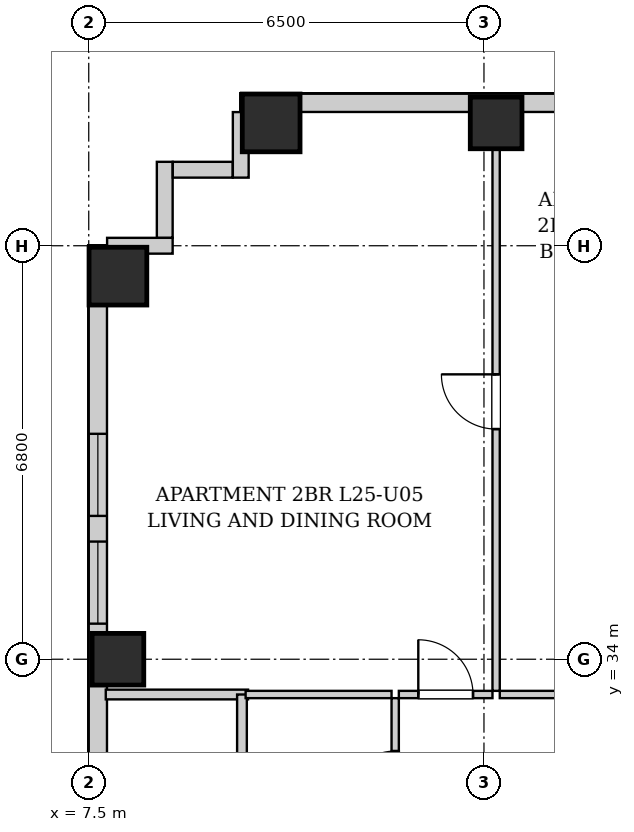
"""IFC4 building model, lengths in metres.
Left out: names, types, materials, properties, quantities, classifications, styles, units other than length and angle.
Written with IfcOpenShell. Run it as: python <this file> out.ifc"""

import sys

from ifc_helpers import new_model, si_unit, direction, frame, frame_2d, origin, origin_2d, place, context, subcontext, project, spatial, rectangle, extrude, element, fill, save


model = new_model("IFC4")
c1 = context("Model", 3, precision=1e-05, world=origin(), true_north=direction((0.0, 1.0)))
c2 = subcontext(c1, "Body", "Model", "MODEL_VIEW")
j1 = project(units=[si_unit("LENGTHUNIT", "METRE"), si_unit("PLANEANGLEUNIT", "RADIAN")], contexts=[c1])
p1 = place(None, origin())
s1 = spatial("IfcSite", under=j1, at=p1, CompositionType="ELEMENT")
p2 = place(p1, origin())
s2 = spatial("IfcBuilding", under=s1, at=p2, CompositionType="ELEMENT")
p3 = place(p2, frame((0.0, 0.0, 91.1)))
s3 = spatial("IfcBuildingStorey", under=s2, at=p3, CompositionType="ELEMENT", Elevation=91.1)
p4 = place(p3, frame((10.5, 42.82, 0.0), z_axis=(0.0, 0.0, 1.0), x_axis=(1.0, 0.0, 0.0)))
e1 = element("IfcColumn", 1, at=p4, inside=s3, PredefinedType="COLUMN", context=c2, shape_type="SweptSolid", body=[
    extrude(rectangle(XDim=0.95, YDim=0.95, at=origin_2d()), origin(), (0.0, 0.0, 1.0), 3.2),
])
for number, where, z_axis, x_axis in (
    (2, (14.2, 42.82, 0.0), (0.0, 0.0, 1.0), (1.0, 0.0, 0.0)),
    (3, (7.98, 34.0, 0.0), (0.0, 0.0, 1.0), (1.0, 0.0, 0.0)),
):
    element("IfcColumn", number, at=place(p3, frame(where, z_axis=z_axis, x_axis=x_axis)), inside=s3, PredefinedType="COLUMN", context=c2, shape_type="SweptSolid", body=[
        extrude(rectangle(XDim=0.85, YDim=0.85, at=origin_2d()), origin(), (0.0, 0.0, 1.0), 3.2),
    ])
p5 = place(p3, frame((7.98, 40.3, 0.0), z_axis=(0.0, 0.0, 1.0), x_axis=(1.0, 0.0, 0.0)))
e4 = element("IfcColumn", 4, at=p5, inside=s3, PredefinedType="COLUMN", context=c2, shape_type="SweptSolid", body=[
    extrude(rectangle(XDim=0.95, YDim=0.95, at=origin_2d()), origin(), (0.0, 0.0, 1.0), 3.2),
])
p6 = place(p3, frame((10.0, 43.15, 0.0), z_axis=(0.0, 0.0, 1.0), x_axis=(1.0, 0.0, 0.0)))
e5 = element("IfcWall", 5, at=p6, inside=s3, PredefinedType="SOLIDWALL", context=c2, shape_type="SweptSolid", body=[
    extrude(rectangle(XDim=23.9, YDim=0.3, at=frame_2d((11.95, 0.0))), origin(), (0.0, 0.0, 1.0), 2.94),
])
p7 = place(p6, frame((5.337, 0.0, 0.55)))
e6 = element("IfcOpeningElement", 6, at=p7, cuts=e5, PredefinedType="OPENING", context=c2, shape_type="SweptSolid", body=[
    extrude(rectangle(XDim=1.35, YDim=1.2, at=frame_2d((0.675, 0.6))), frame((0.0, 0.16, 0.0), z_axis=(0.0, -1.0, 0.0), x_axis=(1.0, 0.0, 0.0)), (0.0, 0.0, 1.0), 0.32),
])
p8 = place(p6, frame((8.494, 0.0, 0.55)))
e7 = element("IfcOpeningElement", 7, at=p8, cuts=e5, PredefinedType="OPENING", context=c2, shape_type="SweptSolid", body=[
    extrude(rectangle(XDim=1.35, YDim=1.2, at=frame_2d((0.675, 0.6))), frame((0.0, 0.16, 0.0), z_axis=(0.0, -1.0, 0.0), x_axis=(1.0, 0.0, 0.0)), (0.0, 0.0, 1.0), 0.32),
])
p9 = place(p6, frame((11.15, 0.0, 0.55)))
e8 = element("IfcOpeningElement", 8, at=p9, cuts=e5, PredefinedType="OPENING", context=c2, shape_type="SweptSolid", body=[
    extrude(rectangle(XDim=1.35, YDim=1.2, at=frame_2d((0.675, 0.6))), frame((0.0, 0.16, 0.0), z_axis=(0.0, -1.0, 0.0), x_axis=(1.0, 0.0, 0.0)), (0.0, 0.0, 1.0), 0.32),
])
p10 = place(p6, frame((17.738, 0.0, 0.55)))
e9 = element("IfcOpeningElement", 9, at=p10, cuts=e5, PredefinedType="OPENING", context=c2, shape_type="SweptSolid", body=[
    extrude(rectangle(XDim=1.35, YDim=1.2, at=frame_2d((0.675, 0.6))), frame((0.0, 0.16, 0.0), z_axis=(0.0, -1.0, 0.0), x_axis=(1.0, 0.0, 0.0)), (0.0, 0.0, 1.0), 0.32),
])
p11 = place(p6, frame((20.97, 0.0, 0.55)))
e10 = element("IfcOpeningElement", 10, at=p11, cuts=e5, PredefinedType="OPENING", context=c2, shape_type="SweptSolid", body=[
    extrude(rectangle(XDim=1.35, YDim=1.2, at=frame_2d((0.675, 0.6))), frame((0.0, 0.16, 0.0), z_axis=(0.0, -1.0, 0.0), x_axis=(1.0, 0.0, 0.0)), (0.0, 0.0, 1.0), 0.32),
])
p12 = place(p3, frame((7.65, 19.4, 0.0), z_axis=(0.0, 0.0, 1.0), x_axis=(0.0, 1.0, 0.0)))
e11 = element("IfcWall", 11, at=p12, inside=s3, PredefinedType="SOLIDWALL", context=c2, shape_type="SweptSolid", body=[
    extrude(rectangle(XDim=21.4, YDim=0.3, at=frame_2d((10.7, 0.0))), origin(), (0.0, 0.0, 1.0), 2.94),
])
p13 = place(p12, frame((16.957, 0.0, 0.55)))
e12 = element("IfcOpeningElement", 12, at=p13, cuts=e11, PredefinedType="OPENING", context=c2, shape_type="SweptSolid", body=[
    extrude(rectangle(XDim=1.35, YDim=1.2, at=frame_2d((0.675, 0.6))), frame((0.0, 0.16, 0.0), z_axis=(0.0, -1.0, 0.0), x_axis=(1.0, 0.0, 0.0)), (0.0, 0.0, 1.0), 0.32),
])
p14 = place(p12, frame((15.185, 0.0, 0.55)))
e13 = element("IfcOpeningElement", 13, at=p14, cuts=e11, PredefinedType="OPENING", context=c2, shape_type="SweptSolid", body=[
    extrude(rectangle(XDim=1.35, YDim=1.2, at=frame_2d((0.675, 0.6))), frame((0.0, 0.16, 0.0), z_axis=(0.0, -1.0, 0.0), x_axis=(1.0, 0.0, 0.0)), (0.0, 0.0, 1.0), 0.32),
])
p15 = place(p12, frame((5.1, 0.0, 0.55)))
e14 = element("IfcOpeningElement", 14, at=p15, cuts=e11, PredefinedType="OPENING", context=c2, shape_type="SweptSolid", body=[
    extrude(rectangle(XDim=1.35, YDim=1.2, at=frame_2d((0.675, 0.6))), frame((0.0, 0.16, 0.0), z_axis=(0.0, -1.0, 0.0), x_axis=(1.0, 0.0, 0.0)), (0.0, 0.0, 1.0), 0.32),
])
p16 = place(p12, frame((6.71, 0.0, 0.55)))
e15 = element("IfcOpeningElement", 15, at=p16, cuts=e11, PredefinedType="OPENING", context=c2, shape_type="SweptSolid", body=[
    extrude(rectangle(XDim=1.35, YDim=1.2, at=frame_2d((0.675, 0.6))), frame((0.0, 0.16, 0.0), z_axis=(0.0, -1.0, 0.0), x_axis=(1.0, 0.0, 0.0)), (0.0, 0.0, 1.0), 0.32),
])
p17 = place(p3, frame((7.802, 40.8, 0.0), z_axis=(0.0, 0.0, 1.0), x_axis=(1.0, 0.0, 0.0)))
e16 = element("IfcWall", 16, at=p17, inside=s3, PredefinedType="SOLIDWALL", context=c2, shape_type="SweptSolid", body=[
    extrude(rectangle(XDim=1.078, YDim=0.26, at=frame_2d((0.539, 0.0))), origin(), (0.0, 0.0, 1.0), 2.94),
])
p18 = place(p3, frame((8.75, 40.932, 0.0), z_axis=(0.0, 0.0, 1.0), x_axis=(0.0, 1.0, 0.0)))
e17 = element("IfcWall", 17, at=p18, inside=s3, PredefinedType="SOLIDWALL", context=c2, shape_type="SweptSolid", body=[
    extrude(rectangle(XDim=1.248, YDim=0.26, at=frame_2d((0.624, 0.0))), origin(), (0.0, 0.0, 1.0), 2.94),
])
p19 = place(p3, frame((8.882, 42.05, 0.0), z_axis=(0.0, 0.0, 1.0), x_axis=(1.0, 0.0, 0.0)))
e18 = element("IfcWall", 18, at=p19, inside=s3, PredefinedType="SOLIDWALL", context=c2, shape_type="SweptSolid", body=[
    extrude(rectangle(XDim=0.986, YDim=0.26, at=frame_2d((0.493, 0.0))), origin(), (0.0, 0.0, 1.0), 2.94),
])
p20 = place(p3, frame((10.0, 41.92, 0.0), z_axis=(0.0, 0.0, 1.0), x_axis=(0.0, 1.0, 0.0)))
e19 = element("IfcWall", 19, at=p20, inside=s3, PredefinedType="SOLIDWALL", context=c2, shape_type="SweptSolid", body=[
    extrude(rectangle(XDim=1.078, YDim=0.26, at=frame_2d((0.539, 0.0))), origin(), (0.0, 0.0, 1.0), 2.94),
])
p21 = place(p3, frame((7.78, 33.42, 0.0), z_axis=(0.0, 0.0, 1.0), x_axis=(1.0, 0.0, 0.0)))
e20 = element("IfcWall", 20, at=p21, inside=s3, PredefinedType="PARTITIONING", context=c2, shape_type="SweptSolid", body=[
    extrude(rectangle(XDim=2.34, YDim=0.16, at=frame_2d((1.17, 0.0))), origin(), (0.0, 0.0, 1.0), 2.94),
])
p22 = place(p3, frame((10.02, 30.76, 0.0), z_axis=(0.0, 0.0, 1.0), x_axis=(0.0, 1.0, 0.0)))
e21 = element("IfcWall", 21, at=p22, inside=s3, PredefinedType="PARTITIONING", context=c2, shape_type="SweptSolid", body=[
    extrude(rectangle(XDim=2.66, YDim=0.16, at=frame_2d((1.33, 0.0))), origin(), (0.0, 0.0, 1.0), 2.94),
])
p23 = place(p3, frame((12.54, 30.76, 0.0), z_axis=(0.0, 0.0, 1.0), x_axis=(0.0, 1.0, 0.0)))
e22 = element("IfcWall", 22, at=p23, inside=s3, PredefinedType="PARTITIONING", context=c2, shape_type="SweptSolid", body=[
    extrude(rectangle(XDim=2.6, YDim=0.12, at=frame_2d((1.3, 0.0))), origin(), (0.0, 0.0, 1.0), 2.94),
])
p24 = place(p23, frame((0.87, 0.0, 0.0)))
e23 = element("IfcOpeningElement", 23, at=p24, cuts=e22, PredefinedType="OPENING", context=c2, shape_type="SweptSolid", body=[
    extrude(rectangle(XDim=0.86, YDim=2.05, at=frame_2d((0.43, 1.025))), frame((0.0, 0.07, 0.0), z_axis=(0.0, -1.0, 0.0), x_axis=(1.0, 0.0, 0.0)), (0.0, 0.0, 1.0), 0.14),
])
p25 = place(p3, frame((10.08, 33.42, 0.0), z_axis=(0.0, 0.0, 1.0), x_axis=(1.0, 0.0, 0.0)))
e24 = element("IfcWall", 24, at=p25, inside=s3, PredefinedType="PARTITIONING", context=c2, shape_type="SweptSolid", body=[
    extrude(rectangle(XDim=2.4, YDim=0.12, at=frame_2d((1.2, 0.0))), origin(), (0.0, 0.0, 1.0), 2.94),
])
p26 = place(p3, frame((12.6, 33.42, 0.0), z_axis=(0.0, 0.0, 1.0), x_axis=(1.0, 0.0, 0.0)))
e25 = element("IfcWall", 25, at=p26, inside=s3, PredefinedType="PARTITIONING", context=c2, shape_type="SweptSolid", body=[
    extrude(rectangle(XDim=1.54, YDim=0.12, at=frame_2d((0.77, 0.0))), origin(), (0.0, 0.0, 1.0), 2.94),
])
p27 = place(p26, frame((0.32, 0.0, 0.0)))
e26 = element("IfcOpeningElement", 26, at=p27, cuts=e25, PredefinedType="OPENING", context=c2, shape_type="SweptSolid", body=[
    extrude(rectangle(XDim=0.9, YDim=2.05, at=frame_2d((0.45, 1.025))), frame((0.0, 0.07, 0.0), z_axis=(0.0, -1.0, 0.0), x_axis=(1.0, 0.0, 0.0)), (0.0, 0.0, 1.0), 0.14),
])
p28 = place(p3, frame((14.26, 33.42, 0.0), z_axis=(0.0, 0.0, 1.0), x_axis=(1.0, 0.0, 0.0)))
e27 = element("IfcWall", 27, at=p28, inside=s3, PredefinedType="PARTITIONING", context=c2, shape_type="SweptSolid", body=[
    extrude(rectangle(XDim=2.78, YDim=0.12, at=frame_2d((1.39, 0.0))), origin(), (0.0, 0.0, 1.0), 2.94),
])
p29 = place(p28, frame((0.94, 0.0, 0.0)))
e28 = element("IfcOpeningElement", 28, at=p29, cuts=e27, PredefinedType="OPENING", context=c2, shape_type="SweptSolid", body=[
    extrude(rectangle(XDim=0.9, YDim=2.05, at=frame_2d((0.45, 1.025))), frame((0.0, 0.07, 0.0), z_axis=(0.0, -1.0, 0.0), x_axis=(1.0, 0.0, 0.0)), (0.0, 0.0, 1.0), 0.14),
])
p30 = place(p3, frame((14.2, 33.48, 0.0), z_axis=(0.0, 0.0, 1.0), x_axis=(0.0, 1.0, 0.0)))
e29 = element("IfcWall", 29, at=p30, inside=s3, PredefinedType="PARTITIONING", context=c2, shape_type="SweptSolid", body=[
    extrude(rectangle(XDim=9.54, YDim=0.12, at=frame_2d((4.77, 0.0))), origin(), (0.0, 0.0, 1.0), 2.94),
])
p31 = place(p30, frame((4.305, 0.0, 0.0)))
e30 = element("IfcOpeningElement", 30, at=p31, cuts=e29, PredefinedType="OPENING", context=c2, shape_type="SweptSolid", body=[
    extrude(rectangle(XDim=0.9, YDim=2.05, at=frame_2d((0.45, 1.025))), frame((0.0, 0.07, 0.0), z_axis=(0.0, -1.0, 0.0), x_axis=(1.0, 0.0, 0.0)), (0.0, 0.0, 1.0), 0.14),
])
p32 = place(p24, origin())
e31 = element("IfcDoor", 31, at=p32, inside=s3, OperationType="SINGLE_SWING_LEFT", PredefinedType="DOOR", context=c2, shape_type="SweptSolid", body=[
    extrude(rectangle(XDim=0.86, YDim=2.05, at=frame_2d((0.43, 1.025))), frame((0.0, 0.025, 0.0), z_axis=(0.0, -1.0, 0.0), x_axis=(1.0, 0.0, 0.0)), (0.0, 0.0, 1.0), 0.05),
])
fill(e23, e31)
p33 = place(p27, origin())
e32 = element("IfcDoor", 32, at=p33, inside=s3, OperationType="SINGLE_SWING_LEFT", PredefinedType="DOOR", context=c2, shape_type="SweptSolid", body=[
    extrude(rectangle(XDim=0.9, YDim=2.05, at=frame_2d((0.45, 1.025))), frame((0.0, 0.025, 0.0), z_axis=(0.0, -1.0, 0.0), x_axis=(1.0, 0.0, 0.0)), (0.0, 0.0, 1.0), 0.05),
])
fill(e26, e32)
p34 = place(p31, origin())
e33 = element("IfcDoor", 33, at=p34, inside=s3, OperationType="SINGLE_SWING_RIGHT", PredefinedType="DOOR", context=c2, shape_type="SweptSolid", body=[
    extrude(rectangle(XDim=0.9, YDim=2.05, at=frame_2d((0.45, 1.025))), frame((0.0, 0.025, 0.0), z_axis=(0.0, -1.0, 0.0), x_axis=(1.0, 0.0, 0.0)), (0.0, 0.0, 1.0), 0.05),
])
fill(e30, e33)
p35 = place(p13, origin())
e34 = element("IfcWindow", 34, at=p35, inside=s3, PartitioningType="SINGLE_PANEL", PredefinedType="WINDOW", context=c2, shape_type="SweptSolid", body=[
    extrude(rectangle(XDim=1.35, YDim=1.2, at=frame_2d((0.675, 0.6))), frame((0.0, 0.03, 0.0), z_axis=(0.0, -1.0, 0.0), x_axis=(1.0, 0.0, 0.0)), (0.0, 0.0, 1.0), 0.06),
])
fill(e12, e34)
p36 = place(p14, origin())
e35 = element("IfcWindow", 35, at=p36, inside=s3, PartitioningType="SINGLE_PANEL", PredefinedType="WINDOW", context=c2, shape_type="SweptSolid", body=[
    extrude(rectangle(XDim=1.35, YDim=1.2, at=frame_2d((0.675, 0.6))), frame((0.0, 0.03, 0.0), z_axis=(0.0, -1.0, 0.0), x_axis=(1.0, 0.0, 0.0)), (0.0, 0.0, 1.0), 0.06),
])
fill(e13, e35)
save(model, sys.argv[1])
